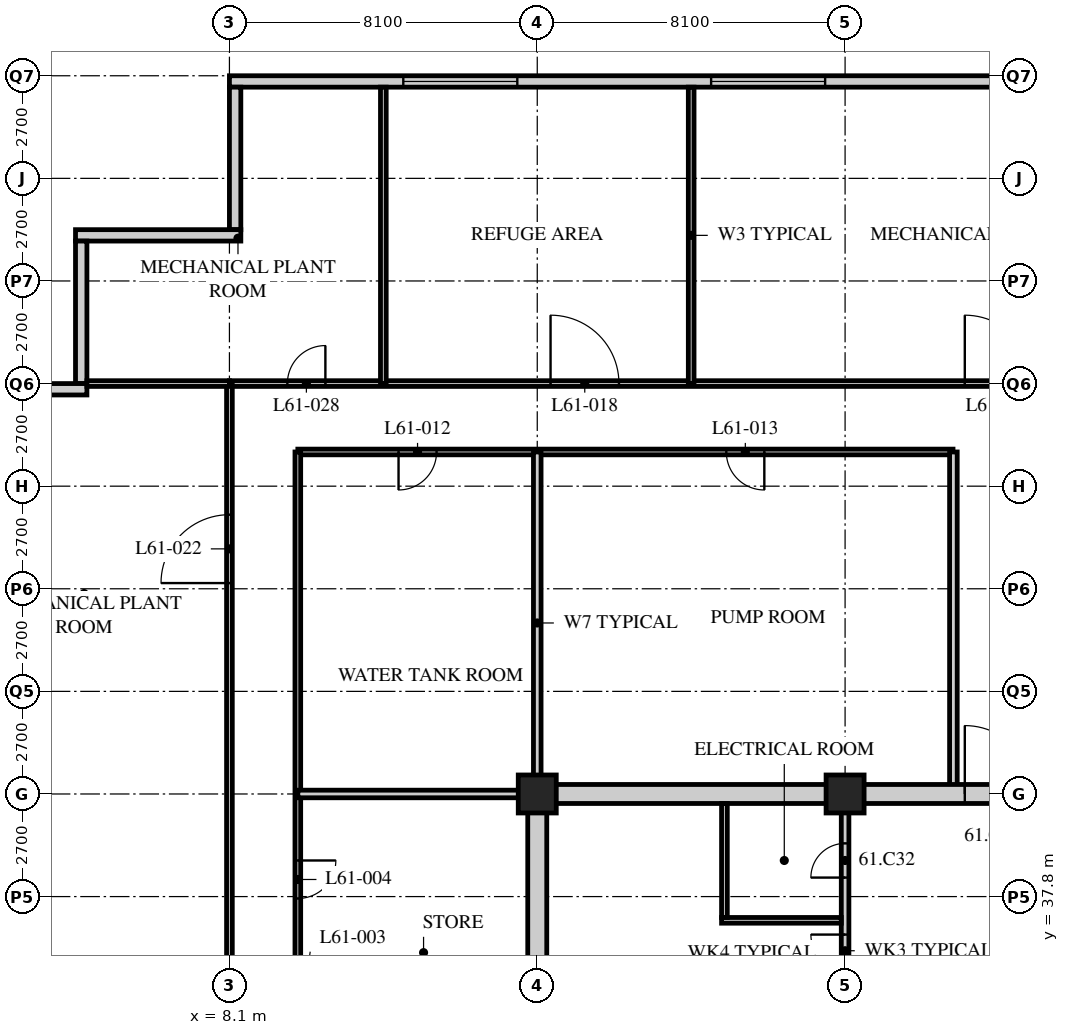
"""IFC4 building model, lengths in metres.
Left out: names, types, materials, properties, quantities, classifications, styles, units other than length and angle.
Written with IfcOpenShell. Run it as: python <this file> out.ifc"""

import sys

from ifc_helpers import new_model, si_unit, direction, frame, frame_2d, origin, origin_2d, place, context, subcontext, project, spatial, rectangle, hollow_rectangle, extrude, element, fill, save


model = new_model("IFC4")
c1 = context("Model", 3, precision=1e-05, world=origin(), true_north=direction((0.0, 1.0)))
c2 = subcontext(c1, "Body", "Model", "MODEL_VIEW")
j1 = project(units=[si_unit("LENGTHUNIT", "METRE"), si_unit("PLANEANGLEUNIT", "RADIAN")], contexts=[c1])
p1 = place(None, origin())
s1 = spatial("IfcSite", under=j1, at=p1, CompositionType="ELEMENT")
p2 = place(p1, origin())
s2 = spatial("IfcBuilding", under=s1, at=p2, CompositionType="ELEMENT")
p3 = place(p2, frame((0.0, 0.0, 235.2)))
s3 = spatial("IfcBuildingStorey", under=s2, at=p3, CompositionType="ELEMENT", Elevation=235.2)
for number, where, z_axis, x_axis in (
    (1, (16.2, 40.5, 0.0), (0.0, 0.0, 1.0), (1.0, 0.0, 0.0)),
    (2, (24.3, 40.5, 0.0), (0.0, 0.0, 1.0), (1.0, 0.0, 0.0)),
):
    element("IfcColumn", number, at=place(p3, frame(where, z_axis=z_axis, x_axis=x_axis)), inside=s3, PredefinedType="COLUMN", context=c2, shape_type="SweptSolid", body=[
        extrude(hollow_rectangle(XDim=1.0, YDim=1.0, WallThickness=0.1, at=origin_2d()), origin(), (0.0, 0.0, 1.0), 7.2),
    ])
p4 = place(p3, frame((48.3, 59.25, 0.0), z_axis=(0.0, 0.0, 1.0), x_axis=(-1.0, 0.0, 0.0)))
e3 = element("IfcWall", 3, at=p4, inside=s3, PredefinedType="SOLIDWALL", context=c2, shape_type="SweptSolid", body=[
    extrude(rectangle(XDim=40.2, YDim=0.3, at=frame_2d((20.1, 0.0))), origin(), (0.0, 0.0, 1.0), 5.95),
])
p5 = place(p4, frame((4.275, 0.0, 1.0)))
e4 = element("IfcOpeningElement", 4, at=p5, cuts=e3, PredefinedType="OPENING", context=c2, shape_type="SweptSolid", body=[
    extrude(rectangle(XDim=3.0, YDim=1.8, at=frame_2d((1.5, 0.9))), frame((0.0, 0.16, 0.0), z_axis=(0.0, -1.0, 0.0), x_axis=(1.0, 0.0, 0.0)), (0.0, 0.0, 1.0), 0.32),
])
p6 = place(p4, frame((12.375, 0.0, 1.0)))
e5 = element("IfcOpeningElement", 5, at=p6, cuts=e3, PredefinedType="OPENING", context=c2, shape_type="SweptSolid", body=[
    extrude(rectangle(XDim=3.0, YDim=1.8, at=frame_2d((1.5, 0.9))), frame((0.0, 0.16, 0.0), z_axis=(0.0, -1.0, 0.0), x_axis=(1.0, 0.0, 0.0)), (0.0, 0.0, 1.0), 0.32),
])
p7 = place(p4, frame((24.525, 0.0, 1.0)))
e6 = element("IfcOpeningElement", 6, at=p7, cuts=e3, PredefinedType="OPENING", context=c2, shape_type="SweptSolid", body=[
    extrude(rectangle(XDim=3.0, YDim=1.8, at=frame_2d((1.5, 0.9))), frame((0.0, 0.16, 0.0), z_axis=(0.0, -1.0, 0.0), x_axis=(1.0, 0.0, 0.0)), (0.0, 0.0, 1.0), 0.32),
])
p8 = place(p4, frame((32.625, 0.0, 1.0)))
e7 = element("IfcOpeningElement", 7, at=p8, cuts=e3, PredefinedType="OPENING", context=c2, shape_type="SweptSolid", body=[
    extrude(rectangle(XDim=3.0, YDim=1.8, at=frame_2d((1.5, 0.9))), frame((0.0, 0.16, 0.0), z_axis=(0.0, -1.0, 0.0), x_axis=(1.0, 0.0, 0.0)), (0.0, 0.0, 1.0), 0.32),
])
p9 = place(p3, frame((8.25, 59.1, 0.0), z_axis=(0.0, 0.0, 1.0), x_axis=(0.0, -1.0, 0.0)))
e8 = element("IfcWall", 8, at=p9, inside=s3, PredefinedType="SOLIDWALL", context=c2, shape_type="SweptSolid", body=[
    extrude(rectangle(XDim=3.75, YDim=0.3, at=frame_2d((1.875, 0.0))), origin(), (0.0, 0.0, 1.0), 5.95),
])
p10 = place(p3, frame((8.4, 55.2, 0.0), z_axis=(0.0, 0.0, 1.0), x_axis=(-1.0, 0.0, 0.0)))
e9 = element("IfcWall", 9, at=p10, inside=s3, PredefinedType="SOLIDWALL", context=c2, shape_type="SweptSolid", body=[
    extrude(rectangle(XDim=4.35, YDim=0.3, at=frame_2d((2.175, 0.0))), origin(), (0.0, 0.0, 1.0), 6.95),
])
p11 = place(p3, frame((4.2, 55.05, 0.0), z_axis=(0.0, 0.0, 1.0), x_axis=(0.0, -1.0, 0.0)))
e10 = element("IfcWall", 10, at=p11, inside=s3, PredefinedType="SOLIDWALL", context=c2, shape_type="SweptSolid", body=[
    extrude(rectangle(XDim=3.75, YDim=0.3, at=frame_2d((1.875, 0.0))), origin(), (0.0, 0.0, 1.0), 6.95),
])
p12 = place(p3, frame((4.35, 51.15, 0.0), z_axis=(0.0, 0.0, 1.0), x_axis=(-1.0, 0.0, 0.0)))
e11 = element("IfcWall", 11, at=p12, inside=s3, PredefinedType="SOLIDWALL", context=c2, shape_type="SweptSolid", body=[
    extrude(rectangle(XDim=4.35, YDim=0.3, at=frame_2d((2.175, 0.0))), origin(), (0.0, 0.0, 1.0), 6.95),
])
p13 = place(p3, frame((8.1, 51.3, 0.0), z_axis=(0.0, 0.0, 1.0), x_axis=(1.0, 0.0, 0.0)))
e12 = element("IfcWall", 12, at=p13, inside=s3, PredefinedType="PARTITIONING", context=c2, shape_type="SweptSolid", body=[
    extrude(rectangle(XDim=40.5, YDim=0.15, at=frame_2d((20.25, 0.0))), origin(), (0.0, 0.0, 1.0), 6.95),
])
p14 = place(p13, frame((8.45, 0.0, 0.0)))
e13 = element("IfcOpeningElement", 13, at=p14, cuts=e12, PredefinedType="OPENING", context=c2, shape_type="SweptSolid", body=[
    extrude(rectangle(XDim=1.8, YDim=2.4, at=frame_2d((0.9, 1.2))), frame((0.0, 0.085, 0.0), z_axis=(0.0, -1.0, 0.0), x_axis=(1.0, 0.0, 0.0)), (0.0, 0.0, 1.0), 0.17),
])
p15 = place(p13, frame((19.35, 0.0, 0.0)))
e14 = element("IfcOpeningElement", 14, at=p15, cuts=e12, PredefinedType="OPENING", context=c2, shape_type="SweptSolid", body=[
    extrude(rectangle(XDim=1.8, YDim=2.4, at=frame_2d((0.9, 1.2))), frame((0.0, 0.085, 0.0), z_axis=(0.0, -1.0, 0.0), x_axis=(1.0, 0.0, 0.0)), (0.0, 0.0, 1.0), 0.17),
])
p16 = place(p13, frame((33.0, 0.0, 0.0)))
e15 = element("IfcOpeningElement", 15, at=p16, cuts=e12, PredefinedType="OPENING", context=c2, shape_type="SweptSolid", body=[
    extrude(rectangle(XDim=1.8, YDim=2.4, at=frame_2d((0.9, 1.2))), frame((0.0, 0.085, 0.0), z_axis=(0.0, -1.0, 0.0), x_axis=(1.0, 0.0, 0.0)), (0.0, 0.0, 1.0), 0.17),
])
p17 = place(p13, frame((37.975, 0.0, 0.0)))
e16 = element("IfcOpeningElement", 16, at=p17, cuts=e12, PredefinedType="OPENING", context=c2, shape_type="SweptSolid", body=[
    extrude(rectangle(XDim=1.0, YDim=2.1, at=frame_2d((0.5, 1.05))), frame((0.0, 0.085, 0.0), z_axis=(0.0, -1.0, 0.0), x_axis=(1.0, 0.0, 0.0)), (0.0, 0.0, 1.0), 0.17),
])
p18 = place(p13, frame((1.525, 0.0, 0.0)))
e17 = element("IfcOpeningElement", 17, at=p18, cuts=e12, PredefinedType="OPENING", context=c2, shape_type="SweptSolid", body=[
    extrude(rectangle(XDim=1.0, YDim=2.1, at=frame_2d((0.5, 1.05))), frame((0.0, 0.085, 0.0), z_axis=(0.0, -1.0, 0.0), x_axis=(1.0, 0.0, 0.0)), (0.0, 0.0, 1.0), 0.17),
])
p19 = place(p3, frame((8.1, 18.9, 0.0), z_axis=(0.0, 0.0, 1.0), x_axis=(0.0, 1.0, 0.0)))
e18 = element("IfcWall", 18, at=p19, inside=s3, PredefinedType="PARTITIONING", context=c2, shape_type="SweptSolid", body=[
    extrude(rectangle(XDim=32.4, YDim=0.15, at=frame_2d((16.2, 0.0))), origin(), (0.0, 0.0, 1.0), 5.95),
])
p20 = place(p19, frame((10.95, 0.0, 0.0)))
e19 = element("IfcOpeningElement", 19, at=p20, cuts=e18, PredefinedType="OPENING", context=c2, shape_type="SweptSolid", body=[
    extrude(rectangle(XDim=1.8, YDim=2.4, at=frame_2d((0.9, 1.2))), frame((0.0, 0.085, 0.0), z_axis=(0.0, -1.0, 0.0), x_axis=(1.0, 0.0, 0.0)), (0.0, 0.0, 1.0), 0.17),
])
p21 = place(p19, frame((27.15, 0.0, 0.0)))
e20 = element("IfcOpeningElement", 20, at=p21, cuts=e18, PredefinedType="OPENING", context=c2, shape_type="SweptSolid", body=[
    extrude(rectangle(XDim=1.8, YDim=2.4, at=frame_2d((0.9, 1.2))), frame((0.0, 0.085, 0.0), z_axis=(0.0, -1.0, 0.0), x_axis=(1.0, 0.0, 0.0)), (0.0, 0.0, 1.0), 0.17),
])
p22 = place(p3, frame((27.14, 49.5, 0.0), z_axis=(0.0, 0.0, 1.0), x_axis=(-1.0, 0.0, 0.0)))
e21 = element("IfcWall", 21, at=p22, inside=s3, PredefinedType="PARTITIONING", context=c2, shape_type="SweptSolid", body=[
    extrude(rectangle(XDim=17.24, YDim=0.15, at=frame_2d((8.62, 0.0))), origin(), (0.0, 0.0, 1.0), 6.95),
])
p23 = place(p22, frame((13.59, 0.0, 0.0)))
e22 = element("IfcOpeningElement", 22, at=p23, cuts=e21, PredefinedType="OPENING", context=c2, shape_type="SweptSolid", body=[
    extrude(rectangle(XDim=1.0, YDim=2.1, at=frame_2d((0.5, 1.05))), frame((0.0, 0.085, 0.0), z_axis=(0.0, -1.0, 0.0), x_axis=(1.0, 0.0, 0.0)), (0.0, 0.0, 1.0), 0.17),
])
p24 = place(p22, frame((4.965, 0.0, 0.0)))
e23 = element("IfcOpeningElement", 23, at=p24, cuts=e21, PredefinedType="OPENING", context=c2, shape_type="SweptSolid", body=[
    extrude(rectangle(XDim=1.0, YDim=2.1, at=frame_2d((0.5, 1.05))), frame((0.0, 0.085, 0.0), z_axis=(0.0, -1.0, 0.0), x_axis=(1.0, 0.0, 0.0)), (0.0, 0.0, 1.0), 0.17),
])
p25 = place(p3, frame((9.9, 49.5, 0.0), z_axis=(0.0, 0.0, 1.0), x_axis=(0.0, -1.0, 0.0)))
e24 = element("IfcWall", 24, at=p25, inside=s3, PredefinedType="PARTITIONING", context=c2, shape_type="SweptSolid", body=[
    extrude(rectangle(XDim=28.8, YDim=0.15, at=frame_2d((14.4, 0.0))), origin(), (0.0, 0.0, 1.0), 6.95),
])
p26 = place(p25, frame((22.975, 0.0, 0.0)))
e25 = element("IfcOpeningElement", 25, at=p26, cuts=e24, PredefinedType="OPENING", context=c2, shape_type="SweptSolid", body=[
    extrude(rectangle(XDim=0.85, YDim=2.1, at=frame_2d((0.425, 1.05))), frame((0.0, 0.085, 0.0), z_axis=(0.0, -1.0, 0.0), x_axis=(1.0, 0.0, 0.0)), (0.0, 0.0, 1.0), 0.17),
])
p27 = place(p25, frame((18.85, 0.0, 0.0)))
e26 = element("IfcOpeningElement", 26, at=p27, cuts=e24, PredefinedType="OPENING", context=c2, shape_type="SweptSolid", body=[
    extrude(rectangle(XDim=1.0, YDim=2.1, at=frame_2d((0.5, 1.05))), frame((0.0, 0.085, 0.0), z_axis=(0.0, -1.0, 0.0), x_axis=(1.0, 0.0, 0.0)), (0.0, 0.0, 1.0), 0.17),
])
p28 = place(p25, frame((14.875, 0.0, 0.0)))
e27 = element("IfcOpeningElement", 27, at=p28, cuts=e24, PredefinedType="OPENING", context=c2, shape_type="SweptSolid", body=[
    extrude(rectangle(XDim=0.85, YDim=2.1, at=frame_2d((0.425, 1.05))), frame((0.0, 0.085, 0.0), z_axis=(0.0, -1.0, 0.0), x_axis=(1.0, 0.0, 0.0)), (0.0, 0.0, 1.0), 0.17),
])
p29 = place(p25, frame((10.75, 0.0, 0.0)))
e28 = element("IfcOpeningElement", 28, at=p29, cuts=e24, PredefinedType="OPENING", context=c2, shape_type="SweptSolid", body=[
    extrude(rectangle(XDim=1.0, YDim=2.1, at=frame_2d((0.5, 1.05))), frame((0.0, 0.085, 0.0), z_axis=(0.0, -1.0, 0.0), x_axis=(1.0, 0.0, 0.0)), (0.0, 0.0, 1.0), 0.17),
])
p30 = place(p3, frame((16.2, 40.5, 0.0), z_axis=(0.0, 0.0, 1.0), x_axis=(0.0, 1.0, 0.0)))
e29 = element("IfcWall", 29, at=p30, inside=s3, PredefinedType="SOLIDWALL", context=c2, shape_type="SweptSolid", body=[
    extrude(rectangle(XDim=9.0, YDim=0.2, at=frame_2d((4.5, 0.0))), origin(), (0.0, 0.0, 1.0), 5.95),
])
p31 = place(p3, frame((27.15, 40.5, 0.0), z_axis=(0.0, 0.0, 1.0), x_axis=(0.0, 1.0, 0.0)))
e30 = element("IfcWall", 30, at=p31, inside=s3, PredefinedType="SOLIDWALL", context=c2, shape_type="SweptSolid", body=[
    extrude(rectangle(XDim=9.0, YDim=0.2, at=frame_2d((4.5, 0.0))), origin(), (0.0, 0.0, 1.0), 6.95),
])
p32 = place(p3, frame((9.9, 40.5, 0.0), z_axis=(0.0, 0.0, 1.0), x_axis=(1.0, 0.0, 0.0)))
e31 = element("IfcWall", 31, at=p32, inside=s3, PredefinedType="SOLIDWALL", context=c2, shape_type="SweptSolid", body=[
    extrude(rectangle(XDim=6.3, YDim=0.2, at=frame_2d((3.15, 0.0))), origin(), (0.0, 0.0, 1.0), 6.25),
])
p33 = place(p3, frame((20.25, 51.3, 0.0), z_axis=(0.0, 0.0, 1.0), x_axis=(0.0, 1.0, 0.0)))
e32 = element("IfcWall", 32, at=p33, inside=s3, PredefinedType="PARTITIONING", context=c2, shape_type="SweptSolid", body=[
    extrude(rectangle(XDim=7.8, YDim=0.15, at=frame_2d((3.9, 0.0))), origin(), (0.0, 0.0, 1.0), 6.95),
])
p34 = place(p3, frame((4.35, 51.3, 0.0), z_axis=(0.0, 0.0, 1.0), x_axis=(1.0, 0.0, 0.0)))
e33 = element("IfcWall", 33, at=p34, inside=s3, PredefinedType="PARTITIONING", context=c2, shape_type="SweptSolid", body=[
    extrude(rectangle(XDim=3.75, YDim=0.15, at=frame_2d((1.875, 0.0))), origin(), (0.0, 0.0, 1.0), 6.95),
])
p35 = place(p3, frame((12.15, 51.3, 0.0), z_axis=(0.0, 0.0, 1.0), x_axis=(0.0, 1.0, 0.0)))
e34 = element("IfcWall", 34, at=p35, inside=s3, PredefinedType="PARTITIONING", context=c2, shape_type="SweptSolid", body=[
    extrude(rectangle(XDim=7.8, YDim=0.15, at=frame_2d((3.9, 0.0))), origin(), (0.0, 0.0, 1.0), 6.95),
])
p36 = place(p3, frame((15.95, 40.5, 0.0), z_axis=(0.0, 0.0, 1.0), x_axis=(1.0, 0.0, 0.0)))
e35 = element("IfcWall", 35, at=p36, inside=s3, PredefinedType="SOLIDWALL", context=c2, shape_type="SweptSolid", body=[
    extrude(rectangle(XDim=24.8, YDim=0.5, at=frame_2d((12.4, 0.0))), origin(), (0.0, 0.0, 1.0), 6.188),
])
p37 = place(p36, frame((11.5, 0.0, 0.0)))
e36 = element("IfcOpeningElement", 36, at=p37, cuts=e35, PredefinedType="OPENING", context=c2, shape_type="SweptSolid", body=[
    extrude(rectangle(XDim=1.8, YDim=2.4, at=frame_2d((0.9, 1.2))), frame((0.0, 0.26, 0.0), z_axis=(0.0, -1.0, 0.0), x_axis=(1.0, 0.0, 0.0)), (0.0, 0.0, 1.0), 0.52),
])
p38 = place(p3, frame((16.2, 24.55, 0.0), z_axis=(0.0, 0.0, 1.0), x_axis=(0.0, 1.0, 0.0)))
e37 = element("IfcWall", 37, at=p38, inside=s3, PredefinedType="SOLIDWALL", context=c2, shape_type="SweptSolid", body=[
    extrude(rectangle(XDim=15.7, YDim=0.5, at=frame_2d((7.85, 0.0))), origin(), (0.0, 0.0, 1.0), 5.95),
])
p39 = place(p3, frame((24.3, 32.5, 0.0), z_axis=(0.0, 0.0, 1.0), x_axis=(0.0, 1.0, 0.0)))
e38 = element("IfcWall", 38, at=p39, inside=s3, PredefinedType="PARTITIONING", context=c2, shape_type="SweptSolid", body=[
    extrude(rectangle(XDim=7.75, YDim=0.2, at=frame_2d((3.875, 0.0))), origin(), (0.0, 0.0, 1.0), 6.25),
])
p40 = place(p39, frame((1.025, 0.0, 0.0)))
e39 = element("IfcOpeningElement", 39, at=p40, cuts=e38, PredefinedType="OPENING", context=c2, shape_type="SweptSolid", body=[
    extrude(rectangle(XDim=0.9, YDim=2.1, at=frame_2d((0.45, 1.05))), frame((0.0, 0.11, 0.0), z_axis=(0.0, -1.0, 0.0), x_axis=(1.0, 0.0, 0.0)), (0.0, 0.0, 1.0), 0.22),
])
p41 = place(p39, frame((3.4, 0.0, 0.0)))
e40 = element("IfcOpeningElement", 40, at=p41, cuts=e38, PredefinedType="OPENING", context=c2, shape_type="SweptSolid", body=[
    extrude(rectangle(XDim=0.9, YDim=2.1, at=frame_2d((0.45, 1.05))), frame((0.0, 0.11, 0.0), z_axis=(0.0, -1.0, 0.0), x_axis=(1.0, 0.0, 0.0)), (0.0, 0.0, 1.0), 0.22),
])
p42 = place(p39, frame((5.8, 0.0, 0.0)))
e41 = element("IfcOpeningElement", 41, at=p42, cuts=e38, PredefinedType="OPENING", context=c2, shape_type="SweptSolid", body=[
    extrude(rectangle(XDim=0.9, YDim=2.1, at=frame_2d((0.45, 1.05))), frame((0.0, 0.11, 0.0), z_axis=(0.0, -1.0, 0.0), x_axis=(1.0, 0.0, 0.0)), (0.0, 0.0, 1.0), 0.22),
])
p43 = place(p3, frame((21.05, 37.175, 0.0), z_axis=(0.0, 0.0, 1.0), x_axis=(1.0, 0.0, 0.0)))
e42 = element("IfcWall", 42, at=p43, inside=s3, PredefinedType="PARTITIONING", context=c2, shape_type="SweptSolid", body=[
    extrude(rectangle(XDim=3.15, YDim=0.15, at=frame_2d((1.575, 0.0))), origin(), (0.0, 0.0, 1.0), 6.95),
])
p44 = place(p3, frame((21.125, 37.25, 0.0), z_axis=(0.0, 0.0, 1.0), x_axis=(0.0, 1.0, 0.0)))
e43 = element("IfcWall", 43, at=p44, inside=s3, PredefinedType="PARTITIONING", context=c2, shape_type="SweptSolid", body=[
    extrude(rectangle(XDim=3.0, YDim=0.15, at=frame_2d((1.5, 0.0))), origin(), (0.0, 0.0, 1.0), 6.95),
])
p45 = place(p7, origin())
e44 = element("IfcWindow", 44, at=p45, inside=s3, PartitioningType="SINGLE_PANEL", PredefinedType="USERDEFINED", context=c2, shape_type="SweptSolid", body=[
    extrude(rectangle(XDim=3.0, YDim=1.8, at=frame_2d((1.5, 0.9))), frame((0.0, 0.075, 0.0), z_axis=(0.0, -1.0, 0.0), x_axis=(1.0, 0.0, 0.0)), (0.0, 0.0, 1.0), 0.15),
])
fill(e6, e44)
p46 = place(p8, origin())
e45 = element("IfcWindow", 45, at=p46, inside=s3, PartitioningType="SINGLE_PANEL", PredefinedType="USERDEFINED", context=c2, shape_type="SweptSolid", body=[
    extrude(rectangle(XDim=3.0, YDim=1.8, at=frame_2d((1.5, 0.9))), frame((0.0, 0.075, 0.0), z_axis=(0.0, -1.0, 0.0), x_axis=(1.0, 0.0, 0.0)), (0.0, 0.0, 1.0), 0.15),
])
fill(e7, e45)
p47 = place(p29, origin())
e46 = element("IfcDoor", 46, at=p47, inside=s3, OperationType="SINGLE_SWING_LEFT", PredefinedType="DOOR", context=c2, shape_type="SweptSolid", body=[
    extrude(rectangle(XDim=1.0, YDim=2.1, at=frame_2d((0.5, 1.05))), frame((0.0, 0.025, 0.0), z_axis=(0.0, -1.0, 0.0), x_axis=(1.0, 0.0, 0.0)), (0.0, 0.0, 1.0), 0.05),
])
fill(e28, e46)
p48 = place(p23, origin())
e47 = element("IfcDoor", 47, at=p48, inside=s3, OperationType="SINGLE_SWING_RIGHT", PredefinedType="DOOR", context=c2, shape_type="SweptSolid", body=[
    extrude(rectangle(XDim=1.0, YDim=2.1, at=frame_2d((0.5, 1.05))), frame((0.0, 0.025, 0.0), z_axis=(0.0, -1.0, 0.0), x_axis=(1.0, 0.0, 0.0)), (0.0, 0.0, 1.0), 0.05),
])
fill(e22, e47)
p49 = place(p24, origin())
e48 = element("IfcDoor", 48, at=p49, inside=s3, OperationType="SINGLE_SWING_LEFT", PredefinedType="DOOR", context=c2, shape_type="SweptSolid", body=[
    extrude(rectangle(XDim=1.0, YDim=2.1, at=frame_2d((0.5, 1.05))), frame((0.0, 0.025, 0.0), z_axis=(0.0, -1.0, 0.0), x_axis=(1.0, 0.0, 0.0)), (0.0, 0.0, 1.0), 0.05),
])
fill(e23, e48)
p50 = place(p14, origin())
e49 = element("IfcDoor", 49, at=p50, inside=s3, OperationType="DOUBLE_DOOR_SINGLE_SWING", PredefinedType="DOOR", context=c2, shape_type="SweptSolid", body=[
    extrude(rectangle(XDim=1.8, YDim=2.4, at=frame_2d((0.9, 1.2))), frame((0.0, 0.025, 0.0), z_axis=(0.0, -1.0, 0.0), x_axis=(1.0, 0.0, 0.0)), (0.0, 0.0, 1.0), 0.05),
])
fill(e13, e49)
p51 = place(p15, origin())
e50 = element("IfcDoor", 50, at=p51, inside=s3, OperationType="DOUBLE_DOOR_SINGLE_SWING", PredefinedType="DOOR", context=c2, shape_type="SweptSolid", body=[
    extrude(rectangle(XDim=1.8, YDim=2.4, at=frame_2d((0.9, 1.2))), frame((0.0, 0.025, 0.0), z_axis=(0.0, -1.0, 0.0), x_axis=(1.0, 0.0, 0.0)), (0.0, 0.0, 1.0), 0.05),
])
fill(e14, e50)
p52 = place(p21, origin())
e51 = element("IfcDoor", 51, at=p52, inside=s3, OperationType="DOUBLE_DOOR_SINGLE_SWING", PredefinedType="DOOR", context=c2, shape_type="SweptSolid", body=[
    extrude(rectangle(XDim=1.8, YDim=2.4, at=frame_2d((0.9, 1.2))), frame((0.0, 0.025, 0.0), z_axis=(0.0, -1.0, 0.0), x_axis=(1.0, 0.0, 0.0)), (0.0, 0.0, 1.0), 0.05),
])
fill(e20, e51)
p53 = place(p18, origin())
e52 = element("IfcDoor", 52, at=p53, inside=s3, OperationType="SINGLE_SWING_RIGHT", PredefinedType="DOOR", context=c2, shape_type="SweptSolid", body=[
    extrude(rectangle(XDim=1.0, YDim=2.1, at=frame_2d((0.5, 1.05))), frame((0.0, 0.025, 0.0), z_axis=(0.0, -1.0, 0.0), x_axis=(1.0, 0.0, 0.0)), (0.0, 0.0, 1.0), 0.05),
])
fill(e17, e52)
p54 = place(p41, origin())
e53 = element("IfcDoor", 53, at=p54, inside=s3, OperationType="SINGLE_SWING_RIGHT", PredefinedType="DOOR", context=c2, shape_type="SweptSolid", body=[
    extrude(rectangle(XDim=0.9, YDim=2.1, at=frame_2d((0.45, 1.05))), frame((0.0, 0.025, 0.0), z_axis=(0.0, -1.0, 0.0), x_axis=(1.0, 0.0, 0.0)), (0.0, 0.0, 1.0), 0.05),
])
fill(e40, e53)
p55 = place(p42, origin())
e54 = element("IfcDoor", 54, at=p55, inside=s3, OperationType="SINGLE_SWING_LEFT", PredefinedType="DOOR", context=c2, shape_type="SweptSolid", body=[
    extrude(rectangle(XDim=0.9, YDim=2.1, at=frame_2d((0.45, 1.05))), frame((0.0, 0.025, 0.0), z_axis=(0.0, -1.0, 0.0), x_axis=(1.0, 0.0, 0.0)), (0.0, 0.0, 1.0), 0.05),
])
fill(e41, e54)
p56 = place(p37, origin())
e55 = element("IfcDoor", 55, at=p56, inside=s3, OperationType="DOUBLE_DOOR_SINGLE_SWING", PredefinedType="DOOR", context=c2, shape_type="SweptSolid", body=[
    extrude(rectangle(XDim=1.8, YDim=2.4, at=frame_2d((0.9, 1.2))), frame((0.0, 0.025, 0.0), z_axis=(0.0, -1.0, 0.0), x_axis=(1.0, 0.0, 0.0)), (0.0, 0.0, 1.0), 0.05),
])
fill(e36, e55)
save(model, sys.argv[1])
